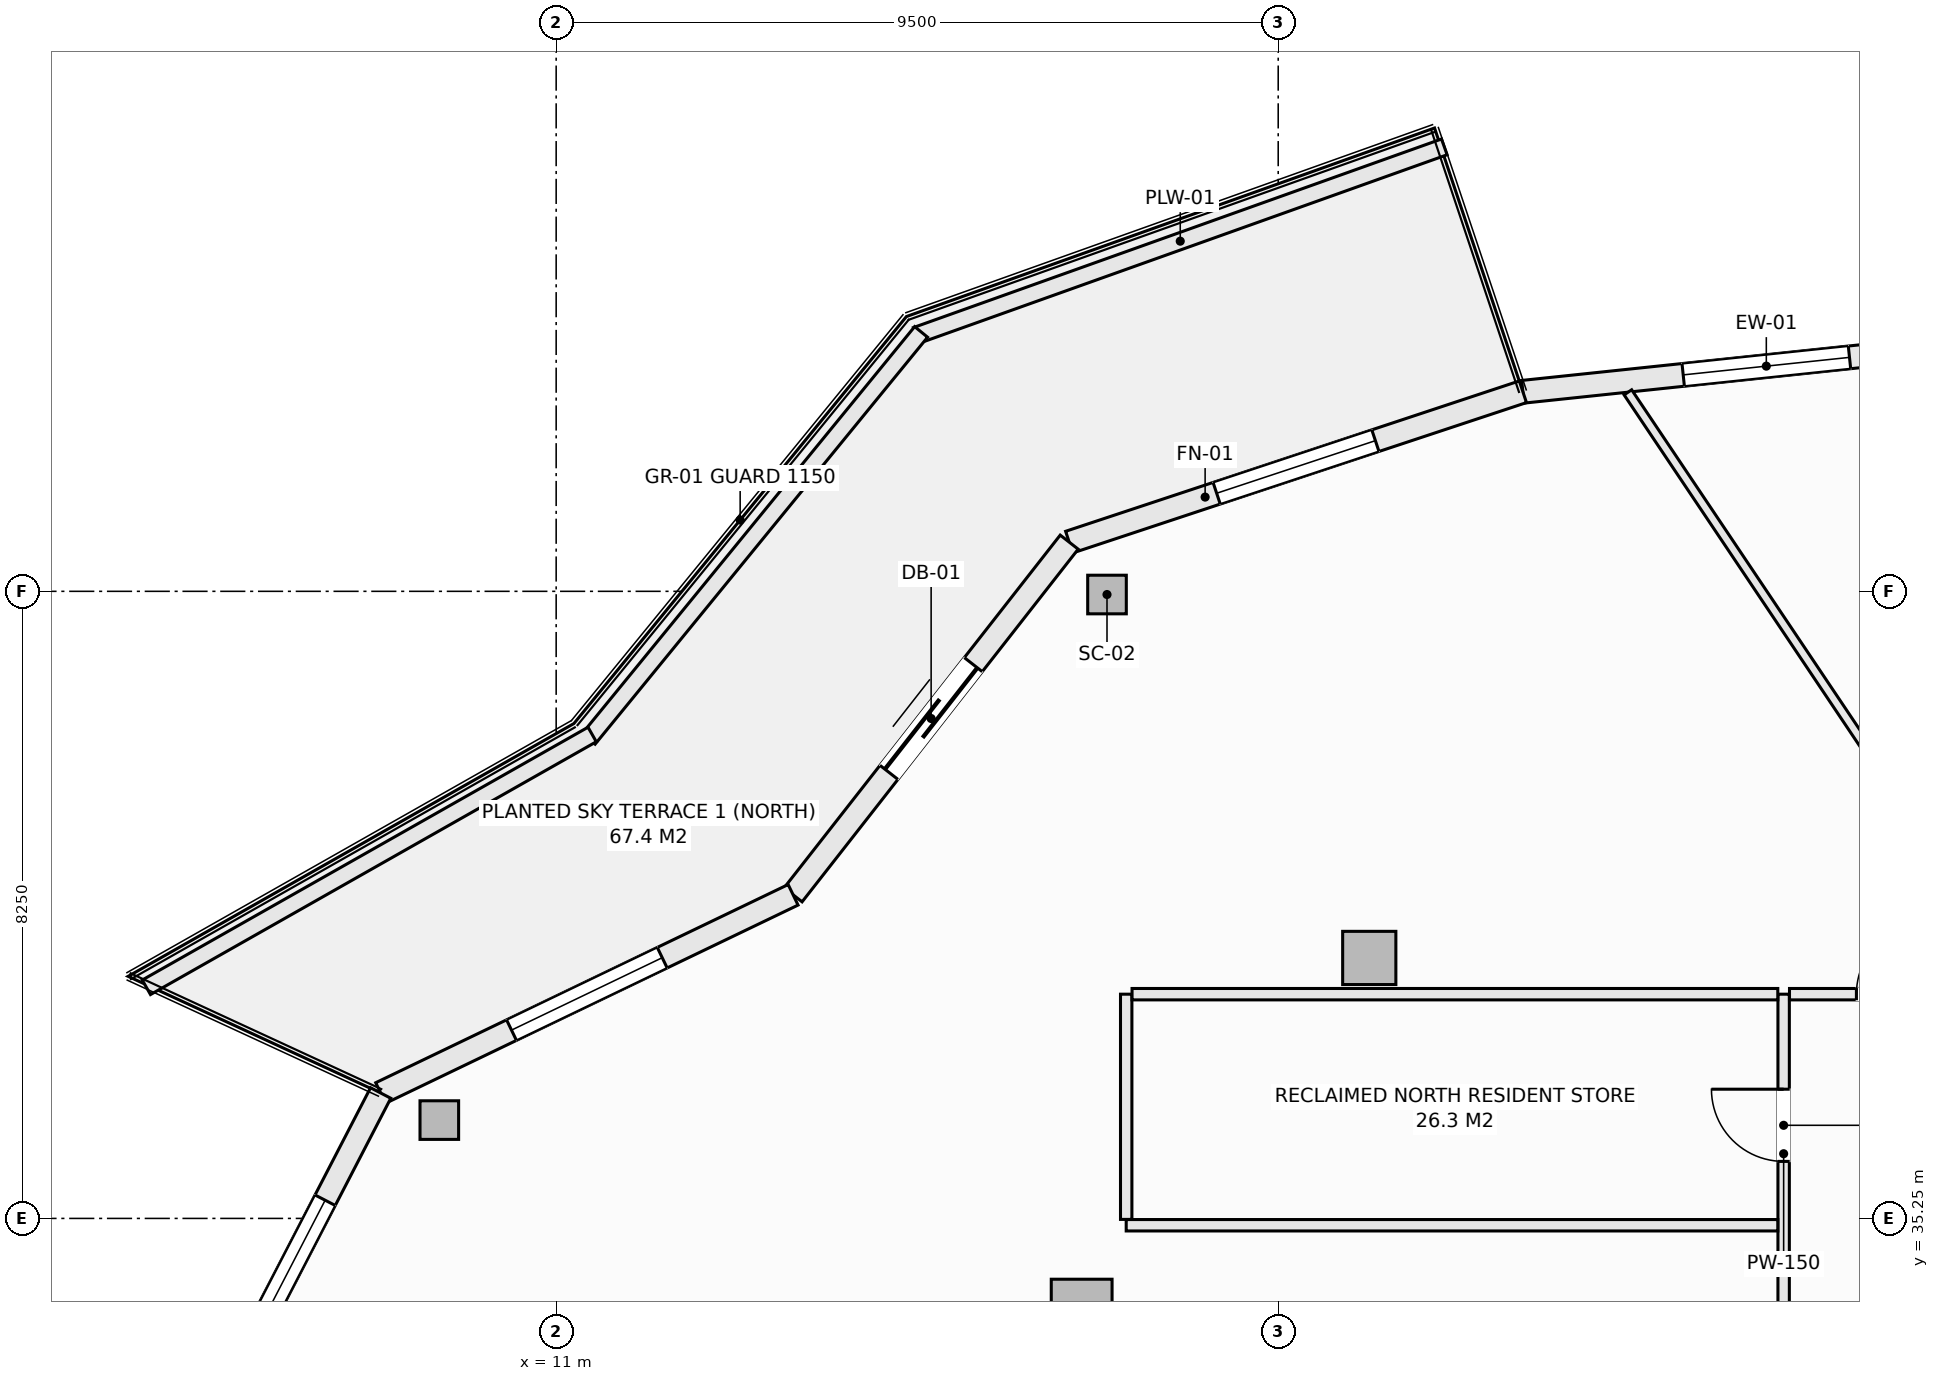
"""IFC4 building model, lengths in metres.
Left out: names, types, materials, properties, quantities, classifications, styles, units other than length and angle.
Written with IfcOpenShell. Run it as: python <this file> out.ifc"""

import sys

from ifc_helpers import new_model, si_unit, direction, frame, frame_2d, origin, origin_2d, place, context, subcontext, project, spatial, rectangle, hollow_rectangle, extrude, element, fill, save


model = new_model("IFC4")
c1 = context("Model", 3, precision=1e-05, world=origin(), true_north=direction((0.0, 1.0)))
c2 = subcontext(c1, "Body", "Model", "MODEL_VIEW")
j1 = project(units=[si_unit("LENGTHUNIT", "METRE"), si_unit("PLANEANGLEUNIT", "RADIAN")], contexts=[c1])
p1 = place(None, origin())
s1 = spatial("IfcSite", under=j1, at=p1, CompositionType="ELEMENT")
p2 = place(p1, origin())
s2 = spatial("IfcBuilding", under=s1, at=p2, CompositionType="ELEMENT")
p3 = place(p2, frame((0.0, 0.0, 222.8)))
s3 = spatial("IfcBuildingStorey", under=s2, at=p3, CompositionType="ELEMENT", Elevation=222.8)
for number, where, z_axis, x_axis in (
    (1, (18.247, 43.458, -0.27), (0.0, 0.0, 1.0), (1.0, 0.0, 0.0)),
    (2, (9.463, 36.544, -0.27), (0.0, 0.0, 1.0), (1.0, 0.0, 0.0)),
):
    element("IfcColumn", number, at=place(p3, frame(where, z_axis=z_axis, x_axis=x_axis)), inside=s3, PredefinedType="COLUMN", context=c2, shape_type="SweptSolid", body=[
        extrude(hollow_rectangle(XDim=0.508, YDim=0.508, WallThickness=0.019, at=origin_2d()), origin(), (0.0, 0.0, 1.0), 3.3),
    ])
p4 = place(p3, frame((21.698, 38.677, -0.27), z_axis=(0.0, 0.0, 1.0), x_axis=(1.0, 0.0, 0.0)))
e3 = element("IfcColumn", 3, at=p4, inside=s3, PredefinedType="COLUMN", context=c2, shape_type="SweptSolid", body=[
    extrude(rectangle(XDim=0.7, YDim=0.7, at=origin_2d()), origin(), (0.0, 0.0, 1.0), 3.3),
])
p5 = place(p3, frame((17.914, 34.05, -0.27), z_axis=(0.0, 0.0, 1.0), x_axis=(1.0, 0.0, 0.0)))
e4 = element("IfcColumn", 4, at=p5, inside=s3, PredefinedType="PILASTER", context=c2, shape_type="SweptSolid", body=[
    extrude(rectangle(XDim=0.8, YDim=0.8, at=origin_2d()), origin(), (0.0, 0.0, 1.0), 3.3),
])
p6 = place(p3, frame((23.719, 46.125, 0.0), z_axis=(0.0, 0.0, 1.0), x_axis=(0.994497142298, 0.104763705363, 0.0)))
e5 = element("IfcWall", 5, at=p6, inside=s3, PredefinedType="SOLIDWALL", context=c2, shape_type="SweptSolid", body=[
    extrude(rectangle(XDim=6.441, YDim=0.3, at=frame_2d((3.221, 0.0))), origin(), (0.0, 0.0, 1.0), 2.605),
])
p7 = place(p6, frame((2.121, 0.0, 0.72)))
e6 = element("IfcOpeningElement", 6, at=p7, cuts=e5, PredefinedType="OPENING", context=c2, shape_type="SweptSolid", body=[
    extrude(rectangle(XDim=2.2, YDim=1.65, at=frame_2d((1.1, 0.825))), frame((0.0, 0.16, 0.0), z_axis=(0.0, -1.0, 0.0), x_axis=(1.0, 0.0, 0.0)), (0.0, 0.0, 1.0), 0.32),
])
p8 = place(p3, frame((17.75, 44.147, 0.0), z_axis=(0.0, 0.0, 1.0), x_axis=(0.949240877604, 0.314550085495, 0.0)))
e7 = element("IfcWall", 7, at=p8, inside=s3, PredefinedType="SOLIDWALL", context=c2, shape_type="SweptSolid", body=[
    extrude(rectangle(XDim=6.288, YDim=0.3, at=frame_2d((3.144, 0.0))), origin(), (0.0, 0.0, 1.0), 2.605),
])
p9 = place(p8, frame((2.044, 0.0, 0.72)))
e8 = element("IfcOpeningElement", 8, at=p9, cuts=e7, PredefinedType="OPENING", context=c2, shape_type="SweptSolid", body=[
    extrude(rectangle(XDim=2.2, YDim=1.65, at=frame_2d((1.1, 0.825))), frame((0.0, 0.16, 0.0), z_axis=(0.0, -1.0, 0.0), x_axis=(1.0, 0.0, 0.0)), (0.0, 0.0, 1.0), 0.32),
])
p10 = place(p3, frame((14.117, 39.507, 0.0), z_axis=(0.0, 0.0, 1.0), x_axis=(0.616450126935, 0.787393955401, 0.0)))
e9 = element("IfcWall", 9, at=p10, inside=s3, PredefinedType="SOLIDWALL", context=c2, shape_type="SweptSolid", body=[
    extrude(rectangle(XDim=5.893, YDim=0.3, at=frame_2d((2.946, 0.0))), origin(), (0.0, 0.0, 1.0), 2.605),
])
p11 = place(p10, frame((2.046, 0.0, 0.0)))
e10 = element("IfcOpeningElement", 10, at=p11, cuts=e9, PredefinedType="OPENING", context=c2, shape_type="SweptSolid", body=[
    extrude(rectangle(XDim=1.8, YDim=2.25, at=frame_2d((0.9, 1.125))), frame((0.0, 0.16, 0.0), z_axis=(0.0, -1.0, 0.0), x_axis=(1.0, 0.0, 0.0)), (0.0, 0.0, 1.0), 0.32),
])
p12 = place(p3, frame((8.691, 36.9, 0.0), z_axis=(0.0, 0.0, 1.0), x_axis=(0.901348331142, 0.433094892545, 0.0)))
e11 = element("IfcWall", 11, at=p12, inside=s3, PredefinedType="SOLIDWALL", context=c2, shape_type="SweptSolid", body=[
    extrude(rectangle(XDim=6.021, YDim=0.3, at=frame_2d((3.01, 0.0))), origin(), (0.0, 0.0, 1.0), 2.605),
])
p13 = place(p12, frame((1.91, 0.0, 0.72)))
e12 = element("IfcOpeningElement", 12, at=p13, cuts=e11, PredefinedType="OPENING", context=c2, shape_type="SweptSolid", body=[
    extrude(rectangle(XDim=2.2, YDim=1.65, at=frame_2d((1.1, 0.825))), frame((0.0, 0.16, 0.0), z_axis=(0.0, -1.0, 0.0), x_axis=(1.0, 0.0, 0.0)), (0.0, 0.0, 1.0), 0.32),
])
p14 = place(p3, frame((6.218, 32.125, 0.0), z_axis=(0.0, 0.0, 1.0), x_axis=(0.459808219482, 0.888018243786, 0.0)))
e13 = element("IfcWall", 13, at=p14, inside=s3, PredefinedType="SOLIDWALL", context=c2, shape_type="SweptSolid", body=[
    extrude(rectangle(XDim=5.378, YDim=0.3, at=frame_2d((2.689, 0.0))), origin(), (0.0, 0.0, 1.0), 2.605),
])
p15 = place(p14, frame((1.589, 0.0, 0.72)))
e14 = element("IfcOpeningElement", 14, at=p15, cuts=e13, PredefinedType="OPENING", context=c2, shape_type="SweptSolid", body=[
    extrude(rectangle(XDim=2.2, YDim=1.65, at=frame_2d((1.1, 0.825))), frame((0.0, 0.16, 0.0), z_axis=(0.0, -1.0, 0.0), x_axis=(1.0, 0.0, 0.0)), (0.0, 0.0, 1.0), 0.32),
])
p16 = place(p3, frame((15.737, 46.866, 0.0), z_axis=(0.0, 0.0, 1.0), x_axis=(0.941780086523, 0.336229488042, 0.0)))
e15 = element("IfcWall", 15, at=p16, inside=s3, PredefinedType="PARAPET", context=c2, shape_type="SweptSolid", body=[
    extrude(rectangle(XDim=7.378, YDim=0.22, at=frame_2d((3.689, 0.0))), origin(), (0.0, 0.0, 1.0), 0.52),
])
p17 = place(p3, frame((11.427, 41.559, 0.0), z_axis=(0.0, 0.0, 1.0), x_axis=(0.632697312147, 0.774399193699, 0.0)))
e16 = element("IfcWall", 16, at=p17, inside=s3, PredefinedType="PARAPET", context=c2, shape_type="SweptSolid", body=[
    extrude(rectangle(XDim=6.914, YDim=0.22, at=frame_2d((3.457, 0.0))), origin(), (0.0, 0.0, 1.0), 0.52),
])
p18 = place(p3, frame((5.608, 38.291, 0.0), z_axis=(0.0, 0.0, 1.0), x_axis=(0.869860619267, 0.493297580623, 0.0)))
e17 = element("IfcWall", 17, at=p18, inside=s3, PredefinedType="PARAPET", context=c2, shape_type="SweptSolid", body=[
    extrude(rectangle(XDim=6.743, YDim=0.22, at=frame_2d((3.371, 0.0))), origin(), (0.0, 0.0, 1.0), 0.52),
])
p19 = place(p3, frame((27.15, 34.002, 0.0), z_axis=(0.0, 0.0, 1.0), x_axis=(0.0, 1.0, 0.0)))
e18 = element("IfcWall", 18, at=p19, inside=s3, PredefinedType="PARTITIONING", context=c2, shape_type="SweptSolid", body=[
    extrude(rectangle(XDim=4.198, YDim=0.15, at=frame_2d((2.099, 0.0))), origin(), (0.0, 0.0, 1.0), 3.03),
])
p20 = place(p19, frame((1.998, 0.0, 0.0)))
e19 = element("IfcOpeningElement", 19, at=p20, cuts=e18, PredefinedType="OPENING", context=c2, shape_type="SweptSolid", body=[
    extrude(rectangle(XDim=0.95, YDim=2.1, at=frame_2d((0.475, 1.05))), frame((0.0, 0.085, 0.0), z_axis=(0.0, -1.0, 0.0), x_axis=(1.0, 0.0, 0.0)), (0.0, 0.0, 1.0), 0.17),
])
p21 = place(p3, frame((18.5, 35.16, 0.0), z_axis=(0.0, 0.0, 1.0), x_axis=(1.0, 0.0, 0.0)))
e20 = element("IfcWall", 20, at=p21, inside=s3, PredefinedType="PARTITIONING", context=c2, shape_type="SweptSolid", body=[
    extrude(rectangle(XDim=8.573, YDim=0.15, at=frame_2d((4.287, 0.0))), origin(), (0.0, 0.0, 1.0), 3.03),
])
p22 = place(p3, frame((18.5, 35.237, 0.0), z_axis=(0.0, 0.0, 1.0), x_axis=(0.0, 1.0, 0.0)))
e21 = element("IfcWall", 21, at=p22, inside=s3, PredefinedType="PARTITIONING", context=c2, shape_type="SweptSolid", body=[
    extrude(rectangle(XDim=2.963, YDim=0.15, at=frame_2d((1.481, 0.0))), origin(), (0.0, 0.0, 1.0), 3.03),
])
p23 = place(p3, frame((18.577, 38.2, 0.0), z_axis=(0.0, 0.0, 1.0), x_axis=(1.0, 0.0, 0.0)))
e22 = element("IfcWall", 22, at=p23, inside=s3, PredefinedType="PARTITIONING", context=c2, shape_type="SweptSolid", body=[
    extrude(rectangle(XDim=8.496, YDim=0.15, at=frame_2d((4.248, 0.0))), origin(), (0.0, 0.0, 1.0), 3.03),
])
p24 = place(p3, frame((27.227, 38.2, 0.0), z_axis=(0.0, 0.0, 1.0), x_axis=(1.0, 0.0, 0.0)))
e23 = element("IfcWall", 23, at=p24, inside=s3, PredefinedType="PARTITIONING", context=c2, shape_type="SweptSolid", body=[
    extrude(rectangle(XDim=2.711, YDim=0.15, at=frame_2d((1.355, 0.0))), origin(), (0.0, 0.0, 1.0), 3.03),
])
p25 = place(p24, frame((0.881, 0.0, 0.0)))
e24 = element("IfcOpeningElement", 24, at=p25, cuts=e23, PredefinedType="OPENING", context=c2, shape_type="SweptSolid", body=[
    extrude(rectangle(XDim=0.95, YDim=2.1, at=frame_2d((0.475, 1.05))), frame((0.0, 0.085, 0.0), z_axis=(0.0, -1.0, 0.0), x_axis=(1.0, 0.0, 0.0)), (0.0, 0.0, 1.0), 0.17),
])
p26 = place(p3, frame((25.101, 46.118, 0.0), z_axis=(0.0, 0.0, 1.0), x_axis=(0.557162782685, -0.830403295749, 0.0)))
e25 = element("IfcWall", 25, at=p26, inside=s3, PredefinedType="PARTITIONING", context=c2, shape_type="SweptSolid", body=[
    extrude(rectangle(XDim=12.411, YDim=0.12, at=frame_2d((6.205, 0.0))), origin(), (0.0, 0.0, 1.0), 3.03),
])
p27 = place(p7, origin())
e26 = element("IfcWindow", 26, at=p27, inside=s3, PartitioningType="SINGLE_PANEL", PredefinedType="WINDOW", context=c2, shape_type="SweptSolid", body=[
    extrude(rectangle(XDim=2.2, YDim=1.65, at=frame_2d((1.1, 0.825))), frame((0.0, 0.03, 0.0), z_axis=(0.0, -1.0, 0.0), x_axis=(1.0, 0.0, 0.0)), (0.0, 0.0, 1.0), 0.06),
])
fill(e6, e26)
p28 = place(p9, origin())
e27 = element("IfcWindow", 27, at=p28, inside=s3, PartitioningType="SINGLE_PANEL", PredefinedType="WINDOW", context=c2, shape_type="SweptSolid", body=[
    extrude(rectangle(XDim=2.2, YDim=1.65, at=frame_2d((1.1, 0.825))), frame((0.0, 0.03, 0.0), z_axis=(0.0, -1.0, 0.0), x_axis=(1.0, 0.0, 0.0)), (0.0, 0.0, 1.0), 0.06),
])
fill(e8, e27)
p29 = place(p11, origin())
e28 = element("IfcDoor", 28, at=p29, inside=s3, OperationType="SLIDING_TO_LEFT", PredefinedType="DOOR", context=c2, shape_type="SweptSolid", body=[
    extrude(rectangle(XDim=1.8, YDim=2.25, at=frame_2d((0.9, 1.125))), frame((0.0, 0.025, 0.0), z_axis=(0.0, -1.0, 0.0), x_axis=(1.0, 0.0, 0.0)), (0.0, 0.0, 1.0), 0.05),
])
fill(e10, e28)
p30 = place(p13, origin())
e29 = element("IfcWindow", 29, at=p30, inside=s3, PartitioningType="SINGLE_PANEL", PredefinedType="WINDOW", context=c2, shape_type="SweptSolid", body=[
    extrude(rectangle(XDim=2.2, YDim=1.65, at=frame_2d((1.1, 0.825))), frame((0.0, 0.03, 0.0), z_axis=(0.0, -1.0, 0.0), x_axis=(1.0, 0.0, 0.0)), (0.0, 0.0, 1.0), 0.06),
])
fill(e12, e29)
p31 = place(p15, origin())
e30 = element("IfcWindow", 30, at=p31, inside=s3, PartitioningType="SINGLE_PANEL", PredefinedType="WINDOW", context=c2, shape_type="SweptSolid", body=[
    extrude(rectangle(XDim=2.2, YDim=1.65, at=frame_2d((1.1, 0.825))), frame((0.0, 0.03, 0.0), z_axis=(0.0, -1.0, 0.0), x_axis=(1.0, 0.0, 0.0)), (0.0, 0.0, 1.0), 0.06),
])
fill(e14, e30)
p32 = place(p20, origin())
e31 = element("IfcDoor", 31, at=p32, inside=s3, OperationType="SINGLE_SWING_RIGHT", PredefinedType="DOOR", context=c2, shape_type="SweptSolid", body=[
    extrude(rectangle(XDim=0.95, YDim=2.1, at=frame_2d((0.475, 1.05))), frame((0.0, 0.025, 0.0), z_axis=(0.0, -1.0, 0.0), x_axis=(1.0, 0.0, 0.0)), (0.0, 0.0, 1.0), 0.05),
])
fill(e19, e31)
p33 = place(p25, origin())
e32 = element("IfcDoor", 32, at=p33, inside=s3, OperationType="SINGLE_SWING_RIGHT", PredefinedType="DOOR", context=c2, shape_type="SweptSolid", body=[
    extrude(rectangle(XDim=0.95, YDim=2.1, at=frame_2d((0.475, 1.05))), frame((0.0, 0.025, 0.0), z_axis=(0.0, -1.0, 0.0), x_axis=(1.0, 0.0, 0.0)), (0.0, 0.0, 1.0), 0.05),
])
fill(e24, e32)
save(model, sys.argv[1])
